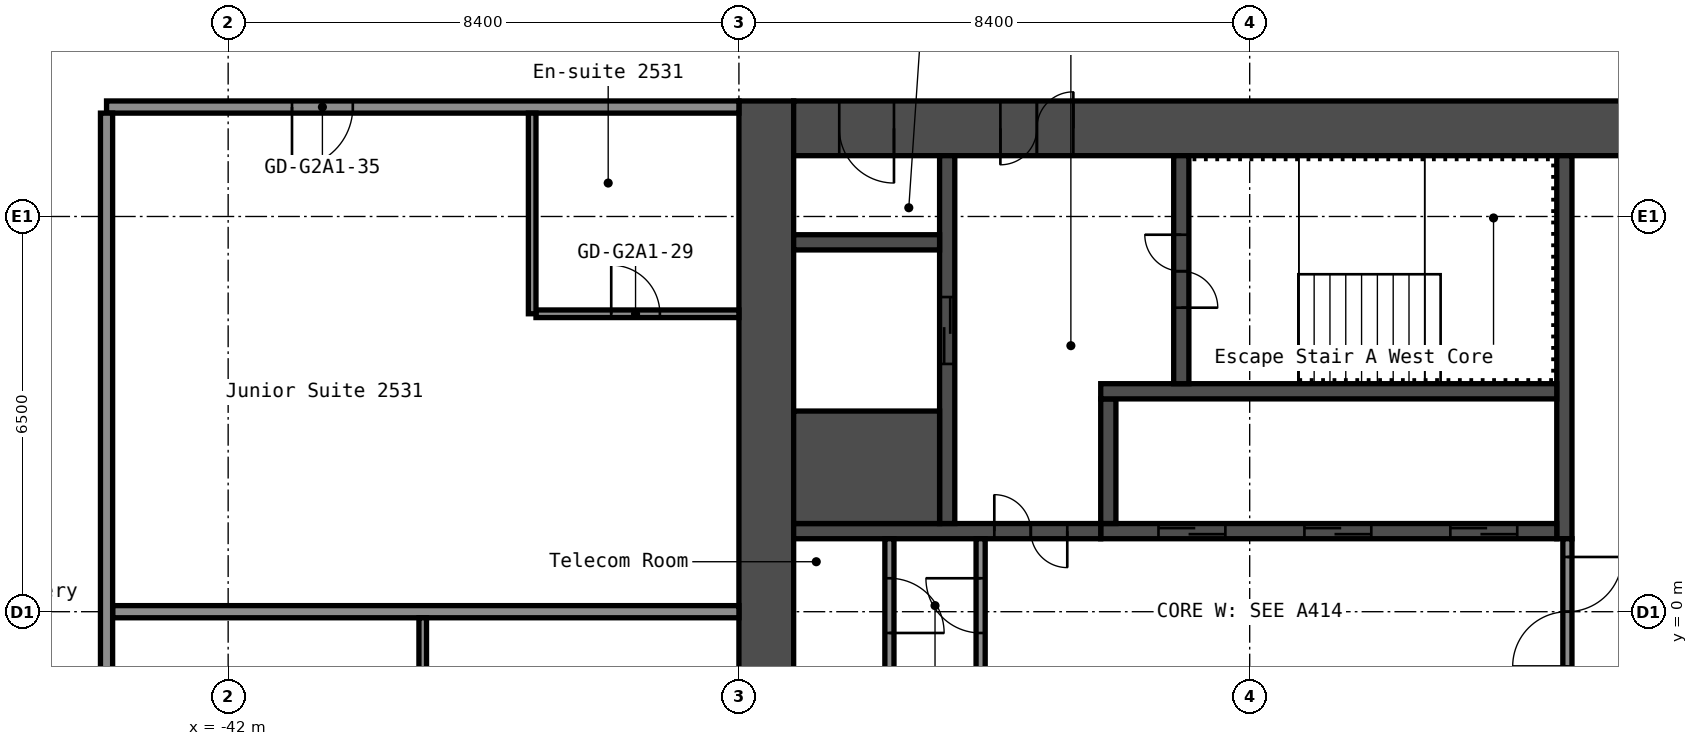
"""IFC4 building model, lengths in metres.
Left out: names, types, materials, properties, quantities, classifications, styles, units other than length and angle.
Written with IfcOpenShell. Run it as: python <this file> out.ifc"""

import sys

from ifc_helpers import new_model, si_unit, direction, frame, frame_2d, origin, place, context, subcontext, project, spatial, rectangle, extrude, element, fill, save


model = new_model("IFC4")
c1 = context("Model", 3, precision=1e-05, world=origin(), true_north=direction((0.0, 1.0)))
c2 = subcontext(c1, "Body", "Model", "MODEL_VIEW")
j1 = project(units=[si_unit("LENGTHUNIT", "METRE"), si_unit("PLANEANGLEUNIT", "RADIAN")], contexts=[c1])
p1 = place(None, origin())
s1 = spatial("IfcSite", under=j1, at=p1, CompositionType="ELEMENT")
p2 = place(p1, origin())
s2 = spatial("IfcBuilding", under=s1, at=p2, CompositionType="ELEMENT")
p3 = place(p2, frame((0.0, 0.0, 91.4)))
s3 = spatial("IfcBuildingStorey", under=s2, at=p3, CompositionType="ELEMENT", Elevation=91.4)
p4 = place(p3, frame((-33.15, -8.4, 0.0), z_axis=(0.0, 0.0, 1.0), x_axis=(0.0, 1.0, 0.0)))
e1 = element("IfcWall", 1, at=p4, inside=s3, PredefinedType="SHEAR", context=c2, shape_type="SweptSolid", body=[
    extrude(rectangle(XDim=16.8, YDim=0.9, at=frame_2d((8.4, 0.0))), origin(), (0.0, 0.0, 1.0), 2.8),
])
p5 = place(p3, frame((-32.7, 7.95, 0.0), z_axis=(0.0, 0.0, 1.0), x_axis=(1.0, 0.0, 0.0)))
e2 = element("IfcWall", 2, at=p5, inside=s3, PredefinedType="SHEAR", context=c2, shape_type="SweptSolid", body=[
    extrude(rectangle(XDim=15.0, YDim=0.9, at=frame_2d((7.5, 0.0))), origin(), (0.0, 0.0, 1.0), 2.8),
])
p6 = place(p5, frame((3.4, 0.0, 0.0)))
e3 = element("IfcOpeningElement", 3, at=p6, cuts=e2, PredefinedType="OPENING", context=c2, shape_type="SweptSolid", body=[
    extrude(rectangle(XDim=1.2, YDim=2.1, at=frame_2d((0.6, 1.05))), frame((0.0, 0.46, 0.0), z_axis=(0.0, -1.0, 0.0), x_axis=(1.0, 0.0, 0.0)), (0.0, 0.0, 1.0), 0.92),
])
p7 = place(p5, frame((0.75, 0.0, 0.0)))
e4 = element("IfcOpeningElement", 4, at=p7, cuts=e2, PredefinedType="OPENING", context=c2, shape_type="SweptSolid", body=[
    extrude(rectangle(XDim=0.9, YDim=2.1, at=frame_2d((0.45, 1.05))), frame((0.0, 0.46, 0.0), z_axis=(0.0, -1.0, 0.0), x_axis=(1.0, 0.0, 0.0)), (0.0, 0.0, 1.0), 0.92),
])
p8 = place(p3, frame((-20.025, 1.2, 0.0), z_axis=(0.0, 0.0, 1.0), x_axis=(0.0, 1.0, 0.0)))
e5 = element("IfcWall", 5, at=p8, inside=s3, PredefinedType="SHEAR", context=c2, shape_type="SweptSolid", body=[
    extrude(rectangle(XDim=6.3, YDim=0.25, at=frame_2d((3.15, 0.0))), origin(), (0.0, 0.0, 1.0), 2.8),
])
p9 = place(p3, frame((-27.65, 1.325, 0.0), z_axis=(0.0, 0.0, 1.0), x_axis=(1.0, 0.0, 0.0)))
e6 = element("IfcWall", 6, at=p9, inside=s3, PredefinedType="SHEAR", context=c2, shape_type="SweptSolid", body=[
    extrude(rectangle(XDim=7.5, YDim=0.25, at=frame_2d((3.75, 0.0))), origin(), (0.0, 0.0, 1.0), 2.8),
])
p10 = place(p9, frame((5.75, 0.0, 0.0)))
e7 = element("IfcOpeningElement", 7, at=p10, cuts=e6, PredefinedType="OPENING", context=c2, shape_type="SweptSolid", body=[
    extrude(rectangle(XDim=1.1, YDim=2.1, at=frame_2d((0.55, 1.05))), frame((0.0, 0.135, 0.0), z_axis=(0.0, -1.0, 0.0), x_axis=(1.0, 0.0, 0.0)), (0.0, 0.0, 1.0), 0.27),
])
p11 = place(p9, frame((3.35, 0.0, 0.0)))
e8 = element("IfcOpeningElement", 8, at=p11, cuts=e6, PredefinedType="OPENING", context=c2, shape_type="SweptSolid", body=[
    extrude(rectangle(XDim=1.1, YDim=2.1, at=frame_2d((0.55, 1.05))), frame((0.0, 0.135, 0.0), z_axis=(0.0, -1.0, 0.0), x_axis=(1.0, 0.0, 0.0)), (0.0, 0.0, 1.0), 0.27),
])
p12 = place(p9, frame((0.95, 0.0, 0.0)))
e9 = element("IfcOpeningElement", 9, at=p12, cuts=e6, PredefinedType="OPENING", context=c2, shape_type="SweptSolid", body=[
    extrude(rectangle(XDim=1.1, YDim=2.1, at=frame_2d((0.55, 1.05))), frame((0.0, 0.135, 0.0), z_axis=(0.0, -1.0, 0.0), x_axis=(1.0, 0.0, 0.0)), (0.0, 0.0, 1.0), 0.27),
])
p13 = place(p3, frame((-27.525, 1.45, 0.0), z_axis=(0.0, 0.0, 1.0), x_axis=(0.0, 1.0, 0.0)))
e10 = element("IfcWall", 10, at=p13, inside=s3, PredefinedType="SHEAR", context=c2, shape_type="SweptSolid", body=[
    extrude(rectangle(XDim=2.05, YDim=0.25, at=frame_2d((1.025, 0.0))), origin(), (0.0, 0.0, 1.0), 2.8),
])
p14 = place(p3, frame((-27.65, 3.625, 0.0), z_axis=(0.0, 0.0, 1.0), x_axis=(1.0, 0.0, 0.0)))
e11 = element("IfcWall", 11, at=p14, inside=s3, PredefinedType="SHEAR", context=c2, shape_type="SweptSolid", body=[
    extrude(rectangle(XDim=7.5, YDim=0.25, at=frame_2d((3.75, 0.0))), origin(), (0.0, 0.0, 1.0), 2.8),
])
p15 = place(p3, frame((-26.325, 3.75, 0.0), z_axis=(0.0, 0.0, 1.0), x_axis=(0.0, 1.0, 0.0)))
e12 = element("IfcWall", 12, at=p15, inside=s3, PredefinedType="SHEAR", context=c2, shape_type="SweptSolid", body=[
    extrude(rectangle(XDim=3.75, YDim=0.25, at=frame_2d((1.875, 0.0))), origin(), (0.0, 0.0, 1.0), 2.8),
])
p16 = place(p15, frame((1.25, 0.0, 0.0)))
e13 = element("IfcOpeningElement", 13, at=p16, cuts=e12, PredefinedType="OPENING", context=c2, shape_type="SweptSolid", body=[
    extrude(rectangle(XDim=1.2, YDim=2.1, at=frame_2d((0.6, 1.05))), frame((0.0, 0.135, 0.0), z_axis=(0.0, -1.0, 0.0), x_axis=(1.0, 0.0, 0.0)), (0.0, 0.0, 1.0), 0.27),
])
p17 = place(p3, frame((-32.7, 1.325, 0.0), z_axis=(0.0, 0.0, 1.0), x_axis=(1.0, 0.0, 0.0)))
e14 = element("IfcWall", 14, at=p17, inside=s3, PredefinedType="SHEAR", context=c2, shape_type="SweptSolid", body=[
    extrude(rectangle(XDim=5.05, YDim=0.25, at=frame_2d((2.525, 0.0))), origin(), (0.0, 0.0, 1.0), 2.8),
])
p18 = place(p17, frame((3.3, 0.0, 0.0)))
e15 = element("IfcOpeningElement", 15, at=p18, cuts=e14, PredefinedType="OPENING", context=c2, shape_type="SweptSolid", body=[
    extrude(rectangle(XDim=1.2, YDim=2.1, at=frame_2d((0.6, 1.05))), frame((0.0, 0.135, 0.0), z_axis=(0.0, -1.0, 0.0), x_axis=(1.0, 0.0, 0.0)), (0.0, 0.0, 1.0), 0.27),
])
p19 = place(p3, frame((-30.175, 1.45, 0.0), z_axis=(0.0, 0.0, 1.0), x_axis=(0.0, 1.0, 0.0)))
e16 = element("IfcWall", 16, at=p19, inside=s3, PredefinedType="SHEAR", context=c2, shape_type="SweptSolid", body=[
    extrude(rectangle(XDim=6.05, YDim=0.25, at=frame_2d((3.025, 0.0))), origin(), (0.0, 0.0, 1.0), 2.8),
])
p20 = place(p19, frame((2.625, 0.0, 0.0)))
e17 = element("IfcOpeningElement", 17, at=p20, cuts=e16, PredefinedType="OPENING", context=c2, shape_type="SweptSolid", body=[
    extrude(rectangle(XDim=1.1, YDim=2.1, at=frame_2d((0.55, 1.05))), frame((0.0, 0.135, 0.0), z_axis=(0.0, -1.0, 0.0), x_axis=(1.0, 0.0, 0.0)), (0.0, 0.0, 1.0), 0.27),
])
p21 = place(p3, frame((-32.7, 2.375, 0.0), z_axis=(0.0, 0.0, 1.0), x_axis=(1.0, 0.0, 0.0)))
e18 = element("IfcWall", 18, at=p21, inside=s3, PredefinedType="SHEAR", context=c2, shape_type="SweptSolid", body=[
    extrude(rectangle(XDim=2.4, YDim=1.85, at=frame_2d((1.2, 0.0))), origin(), (0.0, 0.0, 1.0), 2.8),
])
p22 = place(p3, frame((-32.7, 6.075, 0.0), z_axis=(0.0, 0.0, 1.0), x_axis=(1.0, 0.0, 0.0)))
e19 = element("IfcWall", 19, at=p22, inside=s3, PredefinedType="SHEAR", context=c2, shape_type="SweptSolid", body=[
    extrude(rectangle(XDim=2.4, YDim=0.25, at=frame_2d((1.2, 0.0))), origin(), (0.0, 0.0, 1.0), 2.8),
])
p23 = place(p3, frame((-19.975, -1.2, 0.0), z_axis=(0.0, 0.0, 1.0), x_axis=(0.0, 1.0, 0.0)))
e20 = element("IfcWall", 20, at=p23, inside=s3, PredefinedType="PARTITIONING", context=c2, shape_type="SweptSolid", body=[
    extrude(rectangle(XDim=2.4, YDim=0.15, at=frame_2d((1.2, 0.0))), origin(), (0.0, 0.0, 1.0), 2.8),
])
p24 = place(p23, frame((0.3, 0.0, 0.0)))
e21 = element("IfcOpeningElement", 21, at=p24, cuts=e20, PredefinedType="OPENING", context=c2, shape_type="SweptSolid", body=[
    extrude(rectangle(XDim=1.8, YDim=2.1, at=frame_2d((0.9, 1.05))), frame((0.0, 0.085, 0.0), z_axis=(0.0, -1.0, 0.0), x_axis=(1.0, 0.0, 0.0)), (0.0, 0.0, 1.0), 0.17),
])
p25 = place(p3, frame((-29.625, -1.15, 0.0), z_axis=(0.0, 0.0, 1.0), x_axis=(0.0, 1.0, 0.0)))
e22 = element("IfcWall", 22, at=p25, inside=s3, PredefinedType="PARTITIONING", context=c2, shape_type="SweptSolid", body=[
    extrude(rectangle(XDim=2.35, YDim=0.15, at=frame_2d((1.175, 0.0))), origin(), (0.0, 0.0, 1.0), 2.8),
])
p26 = place(p25, frame((0.8, 0.0, 0.0)))
e23 = element("IfcOpeningElement", 23, at=p26, cuts=e22, PredefinedType="OPENING", context=c2, shape_type="SweptSolid", body=[
    extrude(rectangle(XDim=0.9, YDim=2.1, at=frame_2d((0.45, 1.05))), frame((0.0, 0.085, 0.0), z_axis=(0.0, -1.0, 0.0), x_axis=(1.0, 0.0, 0.0)), (0.0, 0.0, 1.0), 0.17),
])
p27 = place(p3, frame((-31.125, -1.0, 0.0), z_axis=(0.0, 0.0, 1.0), x_axis=(0.0, 1.0, 0.0)))
e24 = element("IfcWall", 24, at=p27, inside=s3, PredefinedType="PARTITIONING", context=c2, shape_type="SweptSolid", body=[
    extrude(rectangle(XDim=2.2, YDim=0.15, at=frame_2d((1.1, 0.0))), origin(), (0.0, 0.0, 1.0), 2.8),
])
p28 = place(p27, frame((0.65, 0.0, 0.0)))
e25 = element("IfcOpeningElement", 25, at=p28, cuts=e24, PredefinedType="OPENING", context=c2, shape_type="SweptSolid", body=[
    extrude(rectangle(XDim=0.9, YDim=2.1, at=frame_2d((0.45, 1.05))), frame((0.0, 0.085, 0.0), z_axis=(0.0, -1.0, 0.0), x_axis=(1.0, 0.0, 0.0)), (0.0, 0.0, 1.0), 0.17),
])
p29 = place(p3, frame((-43.9, 0.0, 0.0), z_axis=(0.0, 0.0, 1.0), x_axis=(1.0, 0.0, 0.0)))
e26 = element("IfcWall", 26, at=p29, inside=s3, PredefinedType="PARTITIONING", context=c2, shape_type="SweptSolid", body=[
    extrude(rectangle(XDim=10.3, YDim=0.2, at=frame_2d((5.15, 0.0))), origin(), (0.0, 0.0, 1.0), 2.8),
])
p30 = place(p3, frame((-36.938, 4.9, 0.0), z_axis=(0.0, 0.0, 1.0), x_axis=(1.0, 0.0, 0.0)))
e27 = element("IfcWall", 27, at=p30, inside=s3, PredefinedType="PARTITIONING", context=c2, shape_type="SweptSolid", body=[
    extrude(rectangle(XDim=3.337, YDim=0.125, at=frame_2d((1.669, 0.0))), origin(), (0.0, 0.0, 1.0), 2.8),
])
p31 = place(p30, frame((1.238, 0.0, 0.0)))
e28 = element("IfcOpeningElement", 28, at=p31, cuts=e27, PredefinedType="OPENING", context=c2, shape_type="SweptSolid", body=[
    extrude(rectangle(XDim=0.8, YDim=2.1, at=frame_2d((0.4, 1.05))), frame((0.0, 0.073, 0.0), z_axis=(0.0, -1.0, 0.0), x_axis=(1.0, 0.0, 0.0)), (0.0, 0.0, 1.0), 0.145),
])
p32 = place(p3, frame((-44.0, 8.3, 0.0), z_axis=(0.0, 0.0, 1.0), x_axis=(1.0, 0.0, 0.0)))
e29 = element("IfcWall", 29, at=p32, inside=s3, PredefinedType="PARTITIONING", context=c2, shape_type="SweptSolid", body=[
    extrude(rectangle(XDim=10.4, YDim=0.2, at=frame_2d((5.2, 0.0))), origin(), (0.0, 0.0, 1.0), 2.8),
])
p33 = place(p32, frame((3.05, 0.0, 0.0)))
e30 = element("IfcOpeningElement", 30, at=p33, cuts=e29, PredefinedType="OPENING", context=c2, shape_type="SweptSolid", body=[
    extrude(rectangle(XDim=1.0, YDim=2.1, at=frame_2d((0.5, 1.05))), frame((0.0, 0.11, 0.0), z_axis=(0.0, -1.0, 0.0), x_axis=(1.0, 0.0, 0.0)), (0.0, 0.0, 1.0), 0.22),
])
p34 = place(p3, frame((-44.0, -8.2, 0.0), z_axis=(0.0, 0.0, 1.0), x_axis=(0.0, 1.0, 0.0)))
e31 = element("IfcWall", 31, at=p34, inside=s3, PredefinedType="PARTITIONING", context=c2, shape_type="SweptSolid", body=[
    extrude(rectangle(XDim=16.4, YDim=0.2, at=frame_2d((8.2, 0.0))), origin(), (0.0, 0.0, 1.0), 2.8),
])
p35 = place(p3, frame((-38.8, -8.2, 0.0), z_axis=(0.0, 0.0, 1.0), x_axis=(0.0, 1.0, 0.0)))
e32 = element("IfcWall", 32, at=p35, inside=s3, PredefinedType="PARTITIONING", context=c2, shape_type="SweptSolid", body=[
    extrude(rectangle(XDim=8.1, YDim=0.125, at=frame_2d((4.05, 0.0))), origin(), (0.0, 0.0, 1.0), 2.8),
])
p36 = place(p35, frame((4.05, 0.0, 0.0)))
e33 = element("IfcOpeningElement", 33, at=p36, cuts=e32, PredefinedType="OPENING", context=c2, shape_type="SweptSolid", body=[
    extrude(rectangle(XDim=0.9, YDim=2.1, at=frame_2d((0.45, 1.05))), frame((0.0, 0.073, 0.0), z_axis=(0.0, -1.0, 0.0), x_axis=(1.0, 0.0, 0.0)), (0.0, 0.0, 1.0), 0.145),
])
p37 = place(p3, frame((-37.0, 4.9, 0.0), z_axis=(0.0, 0.0, 1.0), x_axis=(0.0, 1.0, 0.0)))
e34 = element("IfcWall", 34, at=p37, inside=s3, PredefinedType="PARTITIONING", context=c2, shape_type="SweptSolid", body=[
    extrude(rectangle(XDim=3.3, YDim=0.125, at=frame_2d((1.65, 0.0))), origin(), (0.0, 0.0, 1.0), 2.8),
])
p38 = place(p6, origin())
e35 = element("IfcDoor", 35, at=p38, inside=s3, OperationType="DOUBLE_DOOR_SINGLE_SWING", PredefinedType="DOOR", context=c2, shape_type="SweptSolid", body=[
    extrude(rectangle(XDim=1.2, YDim=2.1, at=frame_2d((0.6, 1.05))), frame((0.0, 0.025, 0.0), z_axis=(0.0, -1.0, 0.0), x_axis=(1.0, 0.0, 0.0)), (0.0, 0.0, 1.0), 0.05),
])
fill(e3, e35)
p39 = place(p7, origin())
e36 = element("IfcDoor", 36, at=p39, inside=s3, OperationType="SINGLE_SWING_RIGHT", PredefinedType="DOOR", context=c2, shape_type="SweptSolid", body=[
    extrude(rectangle(XDim=0.9, YDim=2.1, at=frame_2d((0.45, 1.05))), frame((0.0, 0.025, 0.0), z_axis=(0.0, -1.0, 0.0), x_axis=(1.0, 0.0, 0.0)), (0.0, 0.0, 1.0), 0.05),
])
fill(e4, e36)
p40 = place(p16, origin())
e37 = element("IfcDoor", 37, at=p40, inside=s3, OperationType="DOUBLE_DOOR_SINGLE_SWING", PredefinedType="DOOR", context=c2, shape_type="SweptSolid", body=[
    extrude(rectangle(XDim=1.2, YDim=2.1, at=frame_2d((0.6, 1.05))), frame((0.0, 0.025, 0.0), z_axis=(0.0, -1.0, 0.0), x_axis=(1.0, 0.0, 0.0)), (0.0, 0.0, 1.0), 0.05),
])
fill(e13, e37)
p41 = place(p18, origin())
e38 = element("IfcDoor", 38, at=p41, inside=s3, OperationType="DOUBLE_DOOR_SINGLE_SWING", PredefinedType="DOOR", context=c2, shape_type="SweptSolid", body=[
    extrude(rectangle(XDim=1.2, YDim=2.1, at=frame_2d((0.6, 1.05))), frame((0.0, 0.025, 0.0), z_axis=(0.0, -1.0, 0.0), x_axis=(1.0, 0.0, 0.0)), (0.0, 0.0, 1.0), 0.05),
])
fill(e15, e38)
p42 = place(p24, origin())
e39 = element("IfcDoor", 39, at=p42, inside=s3, OperationType="DOUBLE_DOOR_SINGLE_SWING", PredefinedType="DOOR", context=c2, shape_type="SweptSolid", body=[
    extrude(rectangle(XDim=1.8, YDim=2.1, at=frame_2d((0.9, 1.05))), frame((0.0, 0.025, 0.0), z_axis=(0.0, -1.0, 0.0), x_axis=(1.0, 0.0, 0.0)), (0.0, 0.0, 1.0), 0.05),
])
fill(e21, e39)
p43 = place(p26, origin())
e40 = element("IfcDoor", 40, at=p43, inside=s3, OperationType="SINGLE_SWING_LEFT", PredefinedType="DOOR", context=c2, shape_type="SweptSolid", body=[
    extrude(rectangle(XDim=0.9, YDim=2.1, at=frame_2d((0.45, 1.05))), frame((0.0, 0.025, 0.0), z_axis=(0.0, -1.0, 0.0), x_axis=(1.0, 0.0, 0.0)), (0.0, 0.0, 1.0), 0.05),
])
fill(e23, e40)
p44 = place(p28, origin())
e41 = element("IfcDoor", 41, at=p44, inside=s3, OperationType="SINGLE_SWING_LEFT", PredefinedType="DOOR", context=c2, shape_type="SweptSolid", body=[
    extrude(rectangle(XDim=0.9, YDim=2.1, at=frame_2d((0.45, 1.05))), frame((0.0, 0.025, 0.0), z_axis=(0.0, -1.0, 0.0), x_axis=(1.0, 0.0, 0.0)), (0.0, 0.0, 1.0), 0.05),
])
fill(e25, e41)
p45 = place(p10, origin())
e42 = element("IfcDoor", 42, at=p45, inside=s3, OperationType="DOUBLE_DOOR_SLIDING", PredefinedType="DOOR", context=c2, shape_type="SweptSolid", body=[
    extrude(rectangle(XDim=1.1, YDim=2.1, at=frame_2d((0.55, 1.05))), frame((0.0, 0.025, 0.0), z_axis=(0.0, -1.0, 0.0), x_axis=(1.0, 0.0, 0.0)), (0.0, 0.0, 1.0), 0.05),
])
fill(e7, e42)
p46 = place(p11, origin())
e43 = element("IfcDoor", 43, at=p46, inside=s3, OperationType="DOUBLE_DOOR_SLIDING", PredefinedType="DOOR", context=c2, shape_type="SweptSolid", body=[
    extrude(rectangle(XDim=1.1, YDim=2.1, at=frame_2d((0.55, 1.05))), frame((0.0, 0.025, 0.0), z_axis=(0.0, -1.0, 0.0), x_axis=(1.0, 0.0, 0.0)), (0.0, 0.0, 1.0), 0.05),
])
fill(e8, e43)
p47 = place(p12, origin())
e44 = element("IfcDoor", 44, at=p47, inside=s3, OperationType="DOUBLE_DOOR_SLIDING", PredefinedType="DOOR", context=c2, shape_type="SweptSolid", body=[
    extrude(rectangle(XDim=1.1, YDim=2.1, at=frame_2d((0.55, 1.05))), frame((0.0, 0.025, 0.0), z_axis=(0.0, -1.0, 0.0), x_axis=(1.0, 0.0, 0.0)), (0.0, 0.0, 1.0), 0.05),
])
fill(e9, e44)
p48 = place(p20, origin())
e45 = element("IfcDoor", 45, at=p48, inside=s3, OperationType="DOUBLE_DOOR_SLIDING", PredefinedType="DOOR", context=c2, shape_type="SweptSolid", body=[
    extrude(rectangle(XDim=1.1, YDim=2.1, at=frame_2d((0.55, 1.05))), frame((0.0, 0.025, 0.0), z_axis=(0.0, -1.0, 0.0), x_axis=(1.0, 0.0, 0.0)), (0.0, 0.0, 1.0), 0.05),
])
fill(e17, e45)
p49 = place(p31, origin())
e46 = element("IfcDoor", 46, at=p49, inside=s3, OperationType="SINGLE_SWING_RIGHT", PredefinedType="DOOR", context=c2, shape_type="SweptSolid", body=[
    extrude(rectangle(XDim=0.8, YDim=2.1, at=frame_2d((0.4, 1.05))), frame((0.0, 0.025, 0.0), z_axis=(0.0, -1.0, 0.0), x_axis=(1.0, 0.0, 0.0)), (0.0, 0.0, 1.0), 0.05),
])
fill(e28, e46)
p50 = place(p33, origin())
e47 = element("IfcDoor", 47, at=p50, inside=s3, OperationType="SINGLE_SWING_LEFT", PredefinedType="DOOR", context=c2, shape_type="SweptSolid", body=[
    extrude(rectangle(XDim=1.0, YDim=2.1, at=frame_2d((0.5, 1.05))), frame((0.0, 0.025, 0.0), z_axis=(0.0, -1.0, 0.0), x_axis=(1.0, 0.0, 0.0)), (0.0, 0.0, 1.0), 0.05),
])
fill(e30, e47)
save(model, sys.argv[1])
